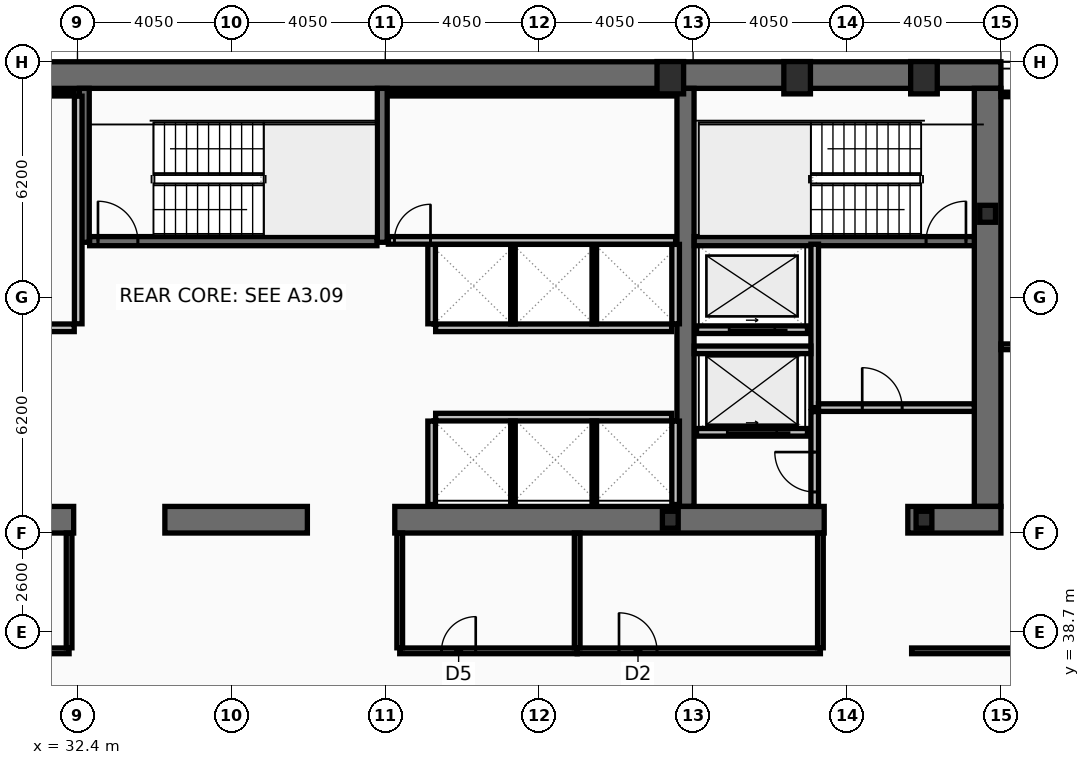
"""IFC4 building model, lengths in metres.
Left out: names, types, materials, properties, quantities, classifications, styles, units other than length and angle.
Written with IfcOpenShell. Run it as: python <this file> out.ifc"""

import sys

from ifc_helpers import new_model, si_unit, direction, frame, frame_2d, origin, origin_2d, place, context, subcontext, project, spatial, rectangle, hollow_rectangle, i_section, extrude, element, fill, save


model = new_model("IFC4")
c1 = context("Model", 3, precision=1e-05, world=origin(), true_north=direction((0.0, 1.0)))
c2 = subcontext(c1, "Body", "Model", "MODEL_VIEW")
j1 = project(units=[si_unit("LENGTHUNIT", "METRE"), si_unit("PLANEANGLEUNIT", "RADIAN")], contexts=[c1])
p1 = place(None, origin())
s1 = spatial("IfcSite", under=j1, at=p1, CompositionType="ELEMENT")
p2 = place(p1, origin())
s2 = spatial("IfcBuilding", under=s1, at=p2, CompositionType="ELEMENT")
p3 = place(p2, frame((0.0, 0.0, 121.8)))
s3 = spatial("IfcBuildingStorey", under=s2, at=p3, CompositionType="ELEMENT", Elevation=121.8)
p4 = place(p3, frame((16.2, 53.35, 0.0), z_axis=(0.0, 0.0, 1.0), x_axis=(1.0, 0.0, 0.0)))
e1 = element("IfcWall", 1, at=p4, inside=s3, PredefinedType="SHEAR", context=c2, shape_type="SweptSolid", body=[
    extrude(rectangle(XDim=40.5, YDim=0.7, at=frame_2d((20.25, 0.0))), origin(), (0.0, 0.0, 1.0), 3.44),
])
p5 = place(p3, frame((56.35, 53.0, 0.0), z_axis=(0.0, 0.0, 1.0), x_axis=(0.0, -1.0, 0.0)))
e2 = element("IfcWall", 2, at=p5, inside=s3, PredefinedType="SHEAR", context=c2, shape_type="SweptSolid", body=[
    extrude(rectangle(XDim=11.0, YDim=0.7, at=frame_2d((5.5, 0.0))), origin(), (0.0, 0.0, 1.0), 3.44),
])
p6 = place(p3, frame((48.4, 42.0, 0.0), z_axis=(0.0, 0.0, 1.0), x_axis=(0.0, 1.0, 0.0)))
e3 = element("IfcWall", 3, at=p6, inside=s3, PredefinedType="SHEAR", context=c2, shape_type="SweptSolid", body=[
    extrude(rectangle(XDim=11.0, YDim=0.45, at=frame_2d((5.5, 0.0))), origin(), (0.0, 0.0, 1.0), 3.44),
])
p7 = place(p3, frame((32.3, 41.65, 0.0), z_axis=(0.0, 0.0, 1.0), x_axis=(-1.0, 0.0, 0.0)))
e4 = element("IfcWall", 4, at=p7, inside=s3, PredefinedType="SHEAR", context=c2, shape_type="SweptSolid", body=[
    extrude(rectangle(XDim=11.45, YDim=0.7, at=frame_2d((5.725, 0.0))), origin(), (0.0, 0.0, 1.0), 3.44),
])
p8 = place(p3, frame((38.45, 41.65, 0.0), z_axis=(0.0, 0.0, 1.0), x_axis=(-1.0, 0.0, 0.0)))
e5 = element("IfcWall", 5, at=p8, inside=s3, PredefinedType="SHEAR", context=c2, shape_type="SweptSolid", body=[
    extrude(rectangle(XDim=3.75, YDim=0.7, at=frame_2d((1.875, 0.0))), origin(), (0.0, 0.0, 1.0), 3.44),
])
p9 = place(p3, frame((52.05, 41.65, 0.0), z_axis=(0.0, 0.0, 1.0), x_axis=(-1.0, 0.0, 0.0)))
e6 = element("IfcWall", 6, at=p9, inside=s3, PredefinedType="SHEAR", context=c2, shape_type="SweptSolid", body=[
    extrude(rectangle(XDim=11.3, YDim=0.7, at=frame_2d((5.65, 0.0))), origin(), (0.0, 0.0, 1.0), 3.44),
])
p10 = place(p3, frame((56.7, 41.65, 0.0), z_axis=(0.0, 0.0, 1.0), x_axis=(-1.0, 0.0, 0.0)))
e7 = element("IfcWall", 7, at=p10, inside=s3, PredefinedType="SHEAR", context=c2, shape_type="SweptSolid", body=[
    extrude(rectangle(XDim=2.45, YDim=0.7, at=frame_2d((1.225, 0.0))), origin(), (0.0, 0.0, 1.0), 3.44),
])
for number, where, z_axis, x_axis in (
    (8, (32.58, 48.95, 0.0), (0.0, 0.0, 1.0), (0.0, 1.0, 0.0)),
    (9, (40.42, 48.95, 0.0), (0.0, 0.0, 1.0), (0.0, 1.0, 0.0)),
):
    element("IfcWall", number, at=place(p3, frame(where, z_axis=z_axis, x_axis=x_axis)), inside=s3, PredefinedType="SHEAR", context=c2, shape_type="SweptSolid", body=[
        extrude(rectangle(XDim=4.05, YDim=0.26, at=frame_2d((2.025, 0.0))), origin(), (0.0, 0.0, 1.0), 3.44),
    ])
p11 = place(p3, frame((48.63, 48.98, 0.0), z_axis=(0.0, 0.0, 1.0), x_axis=(1.0, 0.0, 0.0)))
e10 = element("IfcWall", 10, at=p11, inside=s3, PredefinedType="SHEAR", context=c2, shape_type="SweptSolid", body=[
    extrude(rectangle(XDim=7.37, YDim=0.24, at=frame_2d((3.685, 0.0))), origin(), (0.0, 0.0, 1.0), 3.44),
])
p12 = place(p11, frame((6.1, 0.0, 0.0)))
e11 = element("IfcOpeningElement", 11, at=p12, cuts=e10, PredefinedType="OPENING", context=c2, shape_type="SweptSolid", body=[
    extrude(rectangle(XDim=1.05, YDim=2.15, at=frame_2d((0.525, 1.075))), frame((0.0, 0.13, 0.0), z_axis=(0.0, -1.0, 0.0), x_axis=(1.0, 0.0, 0.0)), (0.0, 0.0, 1.0), 0.26),
])
p13 = place(p3, frame((32.72, 48.98, 0.0), z_axis=(0.0, 0.0, 1.0), x_axis=(1.0, 0.0, 0.0)))
e12 = element("IfcWall", 12, at=p13, inside=s3, PredefinedType="SHEAR", context=c2, shape_type="SweptSolid", body=[
    extrude(rectangle(XDim=7.56, YDim=0.24, at=frame_2d((3.78, 0.0))), origin(), (0.0, 0.0, 1.0), 3.44),
])
p14 = place(p13, frame((0.22, 0.0, 0.0)))
e13 = element("IfcOpeningElement", 13, at=p14, cuts=e12, PredefinedType="OPENING", context=c2, shape_type="SweptSolid", body=[
    extrude(rectangle(XDim=1.05, YDim=2.15, at=frame_2d((0.525, 1.075))), frame((0.0, 0.13, 0.0), z_axis=(0.0, -1.0, 0.0), x_axis=(1.0, 0.0, 0.0)), (0.0, 0.0, 1.0), 0.26),
])
for number, where, z_axis, x_axis in (
    (14, (48.0, 53.28, 0.0), (0.0, 0.0, 1.0), (1.0, 0.0, 0.0)),
    (15, (51.337, 53.28, 0.0), (0.0, 0.0, 1.0), (1.0, 0.0, 0.0)),
    (16, (54.675, 53.28, 0.0), (0.0, 0.0, 1.0), (1.0, 0.0, 0.0)),
):
    element("IfcColumn", number, at=place(p3, frame(where, z_axis=z_axis, x_axis=x_axis)), inside=s3, PredefinedType="COLUMN", context=c2, shape_type="SweptSolid", body=[
        extrude(hollow_rectangle(XDim=0.7, YDim=0.85, WallThickness=0.05, at=origin_2d()), origin(), (0.0, 0.0, 1.0), 3.6),
    ])
for number, where, z_axis, x_axis in (
    (17, (56.35, 49.7, 0.0), (0.0, 0.0, 1.0), (1.0, 0.0, 0.0)),
    (18, (48.0, 41.65, 0.0), (0.0, 0.0, 1.0), (1.0, 0.0, 0.0)),
    (19, (54.675, 41.65, 0.0), (0.0, 0.0, 1.0), (1.0, 0.0, 0.0)),
):
    element("IfcColumn", number, at=place(p3, frame(where, z_axis=z_axis, x_axis=x_axis)), inside=s3, PredefinedType="COLUMN", context=c2, shape_type="SweptSolid", body=[
        extrude(i_section(OverallWidth=0.416, OverallDepth=0.446, WebThickness=0.039, FlangeThickness=0.063, at=origin_2d()), origin(), (0.0, 0.0, 1.0), 3.6),
    ])
p15 = place(p3, frame((51.61, 43.95, 0.0), z_axis=(0.0, 0.0, 1.0), x_axis=(-1.0, 0.0, 0.0)))
e20 = element("IfcWall", 20, at=p15, inside=s3, PredefinedType="PARTITIONING", context=c2, shape_type="SweptSolid", body=[
    extrude(rectangle(XDim=2.92, YDim=0.2, at=frame_2d((1.46, 0.0))), origin(), (0.0, 0.0, 1.0), 3.44),
])
p16 = place(p15, frame((0.81, 0.0, 0.0)))
e21 = element("IfcOpeningElement", 21, at=p16, cuts=e20, PredefinedType="OPENING", context=c2, shape_type="SweptSolid", body=[
    extrude(rectangle(XDim=1.3, YDim=2.18, at=frame_2d((0.65, 1.09))), frame((0.0, 0.11, 0.0), z_axis=(0.0, -1.0, 0.0), x_axis=(1.0, 0.0, 0.0)), (0.0, 0.0, 1.0), 0.22),
])
p17 = place(p3, frame((51.61, 46.65, 0.0), z_axis=(0.0, 0.0, 1.0), x_axis=(-1.0, 0.0, 0.0)))
e22 = element("IfcWall", 22, at=p17, inside=s3, PredefinedType="PARTITIONING", context=c2, shape_type="SweptSolid", body=[
    extrude(rectangle(XDim=2.92, YDim=0.2, at=frame_2d((1.46, 0.0))), origin(), (0.0, 0.0, 1.0), 3.44),
])
p18 = place(p17, frame((0.86, 0.0, 0.0)))
e23 = element("IfcOpeningElement", 23, at=p18, cuts=e22, PredefinedType="OPENING", context=c2, shape_type="SweptSolid", body=[
    extrude(rectangle(XDim=1.2, YDim=2.18, at=frame_2d((0.6, 1.09))), frame((0.0, 0.11, 0.0), z_axis=(0.0, -1.0, 0.0), x_axis=(1.0, 0.0, 0.0)), (0.0, 0.0, 1.0), 0.22),
])
p19 = place(p3, frame((51.8, 44.6, 0.0), z_axis=(0.0, 0.0, 1.0), x_axis=(0.0, 1.0, 0.0)))
e24 = element("IfcWall", 24, at=p19, inside=s3, PredefinedType="PARTITIONING", context=c2, shape_type="SweptSolid", body=[
    extrude(rectangle(XDim=4.3, YDim=0.2, at=frame_2d((2.15, 0.0))), origin(), (0.0, 0.0, 1.0), 3.44),
])
p20 = place(p3, frame((51.9, 44.6, 0.0), z_axis=(0.0, 0.0, 1.0), x_axis=(1.0, 0.0, 0.0)))
e25 = element("IfcWall", 25, at=p20, inside=s3, PredefinedType="PARTITIONING", context=c2, shape_type="SweptSolid", body=[
    extrude(rectangle(XDim=4.1, YDim=0.2, at=frame_2d((2.05, 0.0))), origin(), (0.0, 0.0, 1.0), 3.44),
])
p21 = place(p20, frame((1.15, 0.0, 0.0)))
e26 = element("IfcOpeningElement", 26, at=p21, cuts=e25, PredefinedType="OPENING", context=c2, shape_type="SweptSolid", body=[
    extrude(rectangle(XDim=1.05, YDim=2.15, at=frame_2d((0.525, 1.075))), frame((0.0, 0.11, 0.0), z_axis=(0.0, -1.0, 0.0), x_axis=(1.0, 0.0, 0.0)), (0.0, 0.0, 1.0), 0.22),
])
p22 = place(p3, frame((48.63, 46.12, 0.0), z_axis=(0.0, 0.0, 1.0), x_axis=(1.0, 0.0, 0.0)))
e27 = element("IfcWall", 27, at=p22, inside=s3, PredefinedType="PARTITIONING", context=c2, shape_type="SweptSolid", body=[
    extrude(rectangle(XDim=3.07, YDim=0.2, at=frame_2d((1.535, 0.0))), origin(), (0.0, 0.0, 1.0), 3.44),
])
p23 = place(p3, frame((51.8, 42.0, 0.0), z_axis=(0.0, 0.0, 1.0), x_axis=(0.0, 1.0, 0.0)))
e28 = element("IfcWall", 28, at=p23, inside=s3, PredefinedType="PARTITIONING", context=c2, shape_type="SweptSolid", body=[
    extrude(rectangle(XDim=2.495, YDim=0.2, at=frame_2d((1.248, 0.0))), origin(), (0.0, 0.0, 1.0), 3.44),
])
p24 = place(p23, frame((0.38, 0.0, 0.0)))
e29 = element("IfcOpeningElement", 29, at=p24, cuts=e28, PredefinedType="OPENING", context=c2, shape_type="SweptSolid", body=[
    extrude(rectangle(XDim=1.05, YDim=2.15, at=frame_2d((0.525, 1.075))), frame((0.0, 0.11, 0.0), z_axis=(0.0, -1.0, 0.0), x_axis=(1.0, 0.0, 0.0)), (0.0, 0.0, 1.0), 0.22),
])
p25 = place(p3, frame((32.42, 46.805, 0.0), z_axis=(0.0, 0.0, 1.0), x_axis=(0.0, 1.0, 0.0)))
e30 = element("IfcWall", 30, at=p25, inside=s3, PredefinedType="PARTITIONING", context=c2, shape_type="SweptSolid", body=[
    extrude(rectangle(XDim=5.99, YDim=0.2, at=frame_2d((2.995, 0.0))), origin(), (0.0, 0.0, 1.0), 3.44),
])
p26 = place(p3, frame((24.805, 52.86, 0.0), z_axis=(0.0, 0.0, 1.0), x_axis=(1.0, 0.0, 0.0)))
e31 = element("IfcWall", 31, at=p26, inside=s3, PredefinedType="PARTITIONING", context=c2, shape_type="SweptSolid", body=[
    extrude(rectangle(XDim=7.51, YDim=0.12, at=frame_2d((3.755, 0.0))), origin(), (0.0, 0.0, 1.0), 3.44),
])
p27 = place(p3, frame((24.805, 46.7, 0.0), z_axis=(0.0, 0.0, 1.0), x_axis=(1.0, 0.0, 0.0)))
e32 = element("IfcWall", 32, at=p27, inside=s3, PredefinedType="PARTITIONING", context=c2, shape_type="SweptSolid", body=[
    extrude(rectangle(XDim=7.51, YDim=0.2, at=frame_2d((3.755, 0.0))), origin(), (0.0, 0.0, 1.0), 3.44),
])
p28 = place(p27, frame((2.4, 0.0, 0.0)))
e33 = element("IfcOpeningElement", 33, at=p28, cuts=e32, PredefinedType="OPENING", context=c2, shape_type="SweptSolid", body=[
    extrude(rectangle(XDim=0.95, YDim=2.1, at=frame_2d((0.475, 1.05))), frame((0.0, 0.11, 0.0), z_axis=(0.0, -1.0, 0.0), x_axis=(1.0, 0.0, 0.0)), (0.0, 0.0, 1.0), 0.22),
])
p29 = place(p3, frame((41.825, 46.7, 0.0), z_axis=(0.0, 0.0, 1.0), x_axis=(1.0, 0.0, 0.0)))
e34 = element("IfcWall", 34, at=p29, inside=s3, PredefinedType="PARTITIONING", context=c2, shape_type="SweptSolid", body=[
    extrude(rectangle(XDim=6.21, YDim=0.2, at=frame_2d((3.105, 0.0))), origin(), (0.0, 0.0, 1.0), 3.44),
])
for number, where, z_axis, x_axis in (
    (35, (41.72, 46.805, 0.0), (0.0, 0.0, 1.0), (0.0, 1.0, 0.0)),
    (36, (48.14, 46.805, 0.0), (0.0, 0.0, 1.0), (0.0, 1.0, 0.0)),
):
    element("IfcWall", number, at=place(p3, frame(where, z_axis=z_axis, x_axis=x_axis)), inside=s3, PredefinedType="PARTITIONING", context=c2, shape_type="SweptSolid", body=[
        extrude(rectangle(XDim=2.09, YDim=0.2, at=frame_2d((1.045, 0.0))), origin(), (0.0, 0.0, 1.0), 3.44),
    ])
for number, where, z_axis, x_axis in (
    (37, (43.86, 46.805, 0.0), (0.0, 0.0, 1.0), (0.0, 1.0, 0.0)),
    (38, (46.0, 46.805, 0.0), (0.0, 0.0, 1.0), (0.0, 1.0, 0.0)),
):
    element("IfcWall", number, at=place(p3, frame(where, z_axis=z_axis, x_axis=x_axis)), inside=s3, PredefinedType="PARTITIONING", context=c2, shape_type="SweptSolid", body=[
        extrude(rectangle(XDim=2.09, YDim=0.12, at=frame_2d((1.045, 0.0))), origin(), (0.0, 0.0, 1.0), 3.44),
    ])
p30 = place(p3, frame((41.825, 44.35, 0.0), z_axis=(0.0, 0.0, 1.0), x_axis=(1.0, 0.0, 0.0)))
e39 = element("IfcWall", 39, at=p30, inside=s3, PredefinedType="PARTITIONING", context=c2, shape_type="SweptSolid", body=[
    extrude(rectangle(XDim=6.21, YDim=0.2, at=frame_2d((3.105, 0.0))), origin(), (0.0, 0.0, 1.0), 3.44),
])
for number, where, z_axis, x_axis in (
    (40, (41.72, 42.05, 0.0), (0.0, 0.0, 1.0), (0.0, 1.0, 0.0)),
    (41, (48.14, 42.05, 0.0), (0.0, 0.0, 1.0), (0.0, 1.0, 0.0)),
):
    element("IfcWall", number, at=place(p3, frame(where, z_axis=z_axis, x_axis=x_axis)), inside=s3, PredefinedType="PARTITIONING", context=c2, shape_type="SweptSolid", body=[
        extrude(rectangle(XDim=2.195, YDim=0.2, at=frame_2d((1.098, 0.0))), origin(), (0.0, 0.0, 1.0), 3.44),
    ])
for number, where, z_axis, x_axis in (
    (42, (43.86, 42.05, 0.0), (0.0, 0.0, 1.0), (0.0, 1.0, 0.0)),
    (43, (46.0, 42.05, 0.0), (0.0, 0.0, 1.0), (0.0, 1.0, 0.0)),
):
    element("IfcWall", number, at=place(p3, frame(where, z_axis=z_axis, x_axis=x_axis)), inside=s3, PredefinedType="PARTITIONING", context=c2, shape_type="SweptSolid", body=[
        extrude(rectangle(XDim=2.195, YDim=0.12, at=frame_2d((1.098, 0.0))), origin(), (0.0, 0.0, 1.0), 3.44),
    ])
p31 = place(p3, frame((40.58, 52.86, 0.0), z_axis=(0.0, 0.0, 1.0), x_axis=(1.0, 0.0, 0.0)))
e44 = element("IfcWall", 44, at=p31, inside=s3, PredefinedType="PARTITIONING", context=c2, shape_type="SweptSolid", body=[
    extrude(rectangle(XDim=7.56, YDim=0.12, at=frame_2d((3.78, 0.0))), origin(), (0.0, 0.0, 1.0), 3.44),
])
p32 = place(p3, frame((40.58, 49.0, 0.0), z_axis=(0.0, 0.0, 1.0), x_axis=(1.0, 0.0, 0.0)))
e45 = element("IfcWall", 45, at=p32, inside=s3, PredefinedType="PARTITIONING", context=c2, shape_type="SweptSolid", body=[
    extrude(rectangle(XDim=7.56, YDim=0.2, at=frame_2d((3.78, 0.0))), origin(), (0.0, 0.0, 1.0), 3.44),
])
p33 = place(p32, frame((0.16, 0.0, 0.0)))
e46 = element("IfcOpeningElement", 46, at=p33, cuts=e45, PredefinedType="OPENING", context=c2, shape_type="SweptSolid", body=[
    extrude(rectangle(XDim=0.95, YDim=2.1, at=frame_2d((0.475, 1.05))), frame((0.0, 0.11, 0.0), z_axis=(0.0, -1.0, 0.0), x_axis=(1.0, 0.0, 0.0)), (0.0, 0.0, 1.0), 0.22),
])
p34 = place(p3, frame((29.2, 38.2, 0.0), z_axis=(0.0, 0.0, 1.0), x_axis=(1.0, 0.0, 0.0)))
e47 = element("IfcWall", 47, at=p34, inside=s3, PredefinedType="PARTITIONING", context=c2, shape_type="SweptSolid", body=[
    extrude(rectangle(XDim=2.98, YDim=0.15, at=frame_2d((1.49, 0.0))), origin(), (0.0, 0.0, 1.0), 2.73),
])
p35 = place(p34, frame((0.7, 0.0, 0.0)))
e48 = element("IfcOpeningElement", 48, at=p35, cuts=e47, PredefinedType="OPENING", context=c2, shape_type="SweptSolid", body=[
    extrude(rectangle(XDim=0.95, YDim=2.05, at=frame_2d((0.475, 1.025))), frame((0.0, 0.085, 0.0), z_axis=(0.0, -1.0, 0.0), x_axis=(1.0, 0.0, 0.0)), (0.0, 0.0, 1.0), 0.17),
])
p36 = place(p3, frame((32.18, 38.28, 0.0), z_axis=(0.0, 0.0, 1.0), x_axis=(0.0, 1.0, 0.0)))
e49 = element("IfcWall", 49, at=p36, inside=s3, PredefinedType="PARTITIONING", context=c2, shape_type="SweptSolid", body=[
    extrude(rectangle(XDim=3.02, YDim=0.15, at=frame_2d((1.51, 0.0))), origin(), (0.0, 0.0, 1.0), 3.44),
])
p37 = place(p3, frame((40.88, 38.2, 0.0), z_axis=(0.0, 0.0, 1.0), x_axis=(1.0, 0.0, 0.0)))
e50 = element("IfcWall", 50, at=p37, inside=s3, PredefinedType="PARTITIONING", context=c2, shape_type="SweptSolid", body=[
    extrude(rectangle(XDim=4.67, YDim=0.15, at=frame_2d((2.335, 0.0))), origin(), (0.0, 0.0, 1.0), 2.73),
])
p38 = place(p37, frame((1.1, 0.0, 0.0)))
e51 = element("IfcOpeningElement", 51, at=p38, cuts=e50, PredefinedType="OPENING", context=c2, shape_type="SweptSolid", body=[
    extrude(rectangle(XDim=0.9, YDim=2.05, at=frame_2d((0.45, 1.025))), frame((0.0, 0.085, 0.0), z_axis=(0.0, -1.0, 0.0), x_axis=(1.0, 0.0, 0.0)), (0.0, 0.0, 1.0), 0.17),
])
p39 = place(p3, frame((45.55, 38.2, 0.0), z_axis=(0.0, 0.0, 1.0), x_axis=(1.0, 0.0, 0.0)))
e52 = element("IfcWall", 52, at=p39, inside=s3, PredefinedType="PARTITIONING", context=c2, shape_type="SweptSolid", body=[
    extrude(rectangle(XDim=6.4, YDim=0.15, at=frame_2d((3.2, 0.0))), origin(), (0.0, 0.0, 1.0), 2.73),
])
p40 = place(p39, frame((1.1, 0.0, 0.0)))
e53 = element("IfcOpeningElement", 53, at=p40, cuts=e52, PredefinedType="OPENING", context=c2, shape_type="SweptSolid", body=[
    extrude(rectangle(XDim=1.0, YDim=2.05, at=frame_2d((0.5, 1.025))), frame((0.0, 0.085, 0.0), z_axis=(0.0, -1.0, 0.0), x_axis=(1.0, 0.0, 0.0)), (0.0, 0.0, 1.0), 0.17),
])
for number, where, z_axis, x_axis in (
    (54, (40.88, 38.28, 0.0), (0.0, 0.0, 1.0), (0.0, 1.0, 0.0)),
    (55, (45.55, 38.28, 0.0), (0.0, 0.0, 1.0), (0.0, 1.0, 0.0)),
    (56, (51.95, 38.28, 0.0), (0.0, 0.0, 1.0), (0.0, 1.0, 0.0)),
):
    element("IfcWall", number, at=place(p3, frame(where, z_axis=z_axis, x_axis=x_axis)), inside=s3, PredefinedType="PARTITIONING", context=c2, shape_type="SweptSolid", body=[
        extrude(rectangle(XDim=3.02, YDim=0.15, at=frame_2d((1.51, 0.0))), origin(), (0.0, 0.0, 1.0), 3.44),
    ])
p41 = place(p3, frame((54.35, 38.2, 0.0), z_axis=(0.0, 0.0, 1.0), x_axis=(1.0, 0.0, 0.0)))
e57 = element("IfcWall", 57, at=p41, inside=s3, PredefinedType="PARTITIONING", context=c2, shape_type="SweptSolid", body=[
    extrude(rectangle(XDim=14.52, YDim=0.15, at=frame_2d((7.26, 0.0))), origin(), (0.0, 0.0, 1.0), 2.73),
])
p42 = place(p41, frame((3.25, 0.0, 0.0)))
e58 = element("IfcOpeningElement", 58, at=p42, cuts=e57, PredefinedType="OPENING", context=c2, shape_type="SweptSolid", body=[
    extrude(rectangle(XDim=0.95, YDim=2.05, at=frame_2d((0.475, 1.025))), frame((0.0, 0.085, 0.0), z_axis=(0.0, -1.0, 0.0), x_axis=(1.0, 0.0, 0.0)), (0.0, 0.0, 1.0), 0.17),
])
p43 = place(p3, frame((56.7, 46.2, 0.0), z_axis=(0.0, 0.0, 1.0), x_axis=(1.0, 0.0, 0.0)))
e59 = element("IfcWall", 59, at=p43, inside=s3, PredefinedType="PARTITIONING", context=c2, shape_type="SweptSolid", body=[
    extrude(rectangle(XDim=12.105, YDim=0.15, at=frame_2d((6.052, 0.0))), origin(), (0.0, 0.0, 1.0), 2.83),
])
p44 = place(p43, frame((0.9, 0.0, 0.0)))
e60 = element("IfcOpeningElement", 60, at=p44, cuts=e59, PredefinedType="OPENING", context=c2, shape_type="SweptSolid", body=[
    extrude(rectangle(XDim=0.9, YDim=2.05, at=frame_2d((0.45, 1.025))), frame((0.0, 0.085, 0.0), z_axis=(0.0, -1.0, 0.0), x_axis=(1.0, 0.0, 0.0)), (0.0, 0.0, 1.0), 0.17),
])
p45 = place(p3, frame((56.7, 52.84, 0.0), z_axis=(0.0, 0.0, 1.0), x_axis=(1.0, 0.0, 0.0)))
e61 = element("IfcWall", 61, at=p45, inside=s3, PredefinedType="PARTITIONING", context=c2, shape_type="SweptSolid", body=[
    extrude(rectangle(XDim=12.105, YDim=0.12, at=frame_2d((6.052, 0.0))), origin(), (0.0, 0.0, 1.0), 3.44),
])
p46 = place(p12, origin())
e62 = element("IfcDoor", 62, at=p46, inside=s3, OperationType="SINGLE_SWING_RIGHT", PredefinedType="DOOR", context=c2, shape_type="SweptSolid", body=[
    extrude(rectangle(XDim=1.05, YDim=2.15, at=frame_2d((0.525, 1.075))), frame((0.0, 0.025, 0.0), z_axis=(0.0, -1.0, 0.0), x_axis=(1.0, 0.0, 0.0)), (0.0, 0.0, 1.0), 0.05),
])
fill(e11, e62)
p47 = place(p14, origin())
e63 = element("IfcDoor", 63, at=p47, inside=s3, OperationType="SINGLE_SWING_LEFT", PredefinedType="DOOR", context=c2, shape_type="SweptSolid", body=[
    extrude(rectangle(XDim=1.05, YDim=2.15, at=frame_2d((0.525, 1.075))), frame((0.0, 0.025, 0.0), z_axis=(0.0, -1.0, 0.0), x_axis=(1.0, 0.0, 0.0)), (0.0, 0.0, 1.0), 0.05),
])
fill(e13, e63)
p48 = place(p16, origin())
e64 = element("IfcDoor", 64, at=p48, inside=s3, OperationType="SLIDING_TO_LEFT", PredefinedType="DOOR", context=c2, shape_type="SweptSolid", body=[
    extrude(rectangle(XDim=1.3, YDim=2.18, at=frame_2d((0.65, 1.09))), frame((0.0, 0.025, 0.0), z_axis=(0.0, -1.0, 0.0), x_axis=(1.0, 0.0, 0.0)), (0.0, 0.0, 1.0), 0.05),
])
fill(e21, e64)
p49 = place(p18, origin())
e65 = element("IfcDoor", 65, at=p49, inside=s3, OperationType="SLIDING_TO_LEFT", PredefinedType="DOOR", context=c2, shape_type="SweptSolid", body=[
    extrude(rectangle(XDim=1.2, YDim=2.18, at=frame_2d((0.6, 1.09))), frame((0.0, 0.025, 0.0), z_axis=(0.0, -1.0, 0.0), x_axis=(1.0, 0.0, 0.0)), (0.0, 0.0, 1.0), 0.05),
])
fill(e23, e65)
p50 = place(p21, origin())
e66 = element("IfcDoor", 66, at=p50, inside=s3, OperationType="SINGLE_SWING_LEFT", PredefinedType="DOOR", context=c2, shape_type="SweptSolid", body=[
    extrude(rectangle(XDim=1.05, YDim=2.15, at=frame_2d((0.525, 1.075))), frame((0.0, 0.025, 0.0), z_axis=(0.0, -1.0, 0.0), x_axis=(1.0, 0.0, 0.0)), (0.0, 0.0, 1.0), 0.05),
])
fill(e26, e66)
p51 = place(p24, origin())
e67 = element("IfcDoor", 67, at=p51, inside=s3, OperationType="SINGLE_SWING_RIGHT", PredefinedType="DOOR", context=c2, shape_type="SweptSolid", body=[
    extrude(rectangle(XDim=1.05, YDim=2.15, at=frame_2d((0.525, 1.075))), frame((0.0, 0.025, 0.0), z_axis=(0.0, -1.0, 0.0), x_axis=(1.0, 0.0, 0.0)), (0.0, 0.0, 1.0), 0.05),
])
fill(e29, e67)
p52 = place(p33, origin())
e68 = element("IfcDoor", 68, at=p52, inside=s3, OperationType="SINGLE_SWING_RIGHT", PredefinedType="DOOR", context=c2, shape_type="SweptSolid", body=[
    extrude(rectangle(XDim=0.95, YDim=2.1, at=frame_2d((0.475, 1.05))), frame((0.0, 0.025, 0.0), z_axis=(0.0, -1.0, 0.0), x_axis=(1.0, 0.0, 0.0)), (0.0, 0.0, 1.0), 0.05),
])
fill(e46, e68)
p53 = place(p38, origin())
e69 = element("IfcDoor", 69, at=p53, inside=s3, OperationType="SINGLE_SWING_RIGHT", PredefinedType="DOOR", context=c2, shape_type="SweptSolid", body=[
    extrude(rectangle(XDim=0.9, YDim=2.05, at=frame_2d((0.45, 1.025))), frame((0.0, 0.025, 0.0), z_axis=(0.0, -1.0, 0.0), x_axis=(1.0, 0.0, 0.0)), (0.0, 0.0, 1.0), 0.05),
])
fill(e51, e69)
p54 = place(p40, origin())
e70 = element("IfcDoor", 70, at=p54, inside=s3, OperationType="SINGLE_SWING_LEFT", PredefinedType="DOOR", context=c2, shape_type="SweptSolid", body=[
    extrude(rectangle(XDim=1.0, YDim=2.05, at=frame_2d((0.5, 1.025))), frame((0.0, 0.025, 0.0), z_axis=(0.0, -1.0, 0.0), x_axis=(1.0, 0.0, 0.0)), (0.0, 0.0, 1.0), 0.05),
])
fill(e53, e70)
save(model, sys.argv[1])
